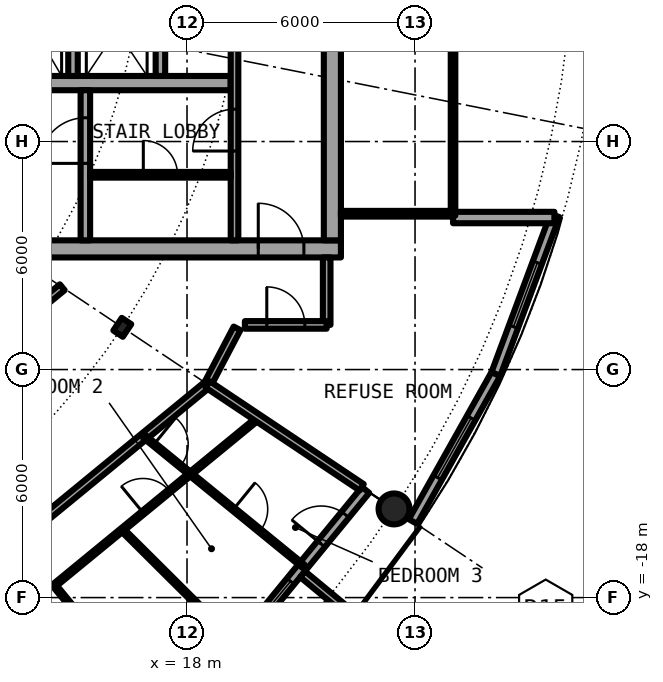
"""IFC4 building model, lengths in metres.
Left out: names, types, materials, properties, quantities, classifications, styles, units other than length and angle.
Written with IfcOpenShell. Run it as: python <this file> out.ifc"""

import sys

from ifc_helpers import new_model, si_unit, direction, frame, frame_2d, origin, origin_2d, place, context, subcontext, project, spatial, rectangle, hollow_circle, i_section, extrude, element, fill, save


model = new_model("IFC4")
c1 = context("Model", 3, precision=1e-05, world=origin(), true_north=direction((0.0, 1.0)))
c2 = subcontext(c1, "Body", "Model", "MODEL_VIEW")
j1 = project(units=[si_unit("LENGTHUNIT", "METRE"), si_unit("PLANEANGLEUNIT", "RADIAN")], contexts=[c1])
p1 = place(None, origin())
s1 = spatial("IfcSite", under=j1, at=p1, CompositionType="ELEMENT")
p2 = place(p1, origin())
s2 = spatial("IfcBuilding", under=s1, at=p2, CompositionType="ELEMENT")
p3 = place(p2, frame((0.0, 0.0, 202.4)))
s3 = spatial("IfcBuildingStorey", under=s2, at=p3, CompositionType="ELEMENT", Elevation=202.4)
p4 = place(p3, frame((23.448, -15.667, 0.0), z_axis=(0.0, 0.0, 1.0), x_axis=(1.0, 0.0, 0.0)))
e1 = element("IfcColumn", 1, at=p4, inside=s3, PredefinedType="COLUMN", context=c2, shape_type="SweptSolid", body=[
    extrude(hollow_circle(Radius=0.406, WallThickness=0.03, at=origin_2d()), origin(), (0.0, 0.0, 1.0), 3.05),
])
p5 = place(p3, frame((16.297, -10.889, 0.0), z_axis=(0.0, 0.0, 1.0), x_axis=(0.831469612303, -0.55557023302, 0.0)))
e2 = element("IfcColumn", 2, at=p5, inside=s3, PredefinedType="COLUMN", context=c2, shape_type="SweptSolid", body=[
    extrude(i_section(OverallWidth=0.3, OverallDepth=0.4, WebThickness=0.013, FlangeThickness=0.024, FilletRadius=0.027, at=origin_2d()), origin(), (0.0, 0.0, 1.0), 3.05),
])
p6 = place(p3, frame((19.304, -19.304, 0.0), z_axis=(0.0, 0.0, 1.0), x_axis=(0.634382322723, 0.773019449054, 0.0)))
e3 = element("IfcWall", 3, at=p6, inside=s3, PredefinedType="SOLIDWALL", context=c2, shape_type="SweptSolid", body=[
    extrude(rectangle(XDim=5.352, YDim=0.25, at=frame_2d((2.676, 0.0))), origin(), (0.0, 0.0, 1.0), 2.7),
])
p7 = place(p6, frame((0.441, 0.0, 0.3)))
e4 = element("IfcOpeningElement", 4, at=p7, cuts=e3, PredefinedType="OPENING", context=c2, shape_type="SweptSolid", body=[
    extrude(rectangle(XDim=1.8, YDim=2.1, at=frame_2d((0.9, 1.05))), frame((0.0, 0.135, 0.0), z_axis=(0.0, -1.0, 0.0), x_axis=(1.0, 0.0, 0.0)), (0.0, 0.0, 1.0), 0.27),
])
p8 = place(p6, frame((3.51, 0.0, 0.0)))
e5 = element("IfcOpeningElement", 5, at=p8, cuts=e3, PredefinedType="OPENING", context=c2, shape_type="SweptSolid", body=[
    extrude(rectangle(XDim=1.0, YDim=2.2, at=frame_2d((0.5, 1.1))), frame((0.0, 0.135, 0.0), z_axis=(0.0, -1.0, 0.0), x_axis=(1.0, 0.0, 0.0)), (0.0, 0.0, 1.0), 0.27),
])
p9 = place(p3, frame((21.041, -17.384, -0.03), z_axis=(0.0, 0.0, 1.0), x_axis=(0.770784861449, -0.63709551667, 0.0)))
e6 = element("IfcWall", 6, at=p9, inside=s3, PredefinedType="SOLIDWALL", context=c2, shape_type="SweptSolid", body=[
    extrude(rectangle(XDim=3.006, YDim=0.2, at=frame_2d((1.503, 0.0))), origin(), (0.0, 0.0, 1.0), 2.73),
])
p10 = place(p3, frame((23.946, -16.0, 0.0), z_axis=(0.0, 0.0, 1.0), x_axis=(0.489696356642, 0.871893042919, 0.0)))
e7 = element("IfcWall", 7, at=p10, inside=s3, PredefinedType="SOLIDWALL", context=c2, shape_type="SweptSolid", body=[
    extrude(rectangle(XDim=4.454, YDim=0.25, at=frame_2d((2.227, 0.0))), origin(), (0.0, 0.0, 1.0), 2.7),
])
p11 = place(p10, frame((1.327, 0.0, 0.3)))
e8 = element("IfcOpeningElement", 8, at=p11, cuts=e7, PredefinedType="OPENING", context=c2, shape_type="SweptSolid", body=[
    extrude(rectangle(XDim=1.8, YDim=2.1, at=frame_2d((0.9, 1.05))), frame((0.0, 0.135, 0.0), z_axis=(0.0, -1.0, 0.0), x_axis=(1.0, 0.0, 0.0)), (0.0, 0.0, 1.0), 0.27),
])
p12 = place(p3, frame((26.127, -12.117, 0.0), z_axis=(0.0, 0.0, 1.0), x_axis=(0.349247811493, 0.937030397675, 0.0)))
e9 = element("IfcWall", 9, at=p12, inside=s3, PredefinedType="SOLIDWALL", context=c2, shape_type="SweptSolid", body=[
    extrude(rectangle(XDim=4.452, YDim=0.25, at=frame_2d((2.226, 0.0))), origin(), (0.0, 0.0, 1.0), 2.7),
])
p13 = place(p12, frame((1.327, 0.0, 0.3)))
e10 = element("IfcOpeningElement", 10, at=p13, cuts=e9, PredefinedType="OPENING", context=c2, shape_type="SweptSolid", body=[
    extrude(rectangle(XDim=1.8, YDim=2.1, at=frame_2d((0.9, 1.05))), frame((0.0, 0.135, 0.0), z_axis=(0.0, -1.0, 0.0), x_axis=(1.0, 0.0, 0.0)), (0.0, 0.0, 1.0), 0.27),
])
p14 = place(p3, frame((25.0, -8.0, 0.0), z_axis=(0.0, 0.0, 1.0), x_axis=(1.0, 0.0, 0.0)))
e11 = element("IfcWall", 11, at=p14, inside=s3, PredefinedType="SOLIDWALL", context=c2, shape_type="SweptSolid", body=[
    extrude(rectangle(XDim=2.667, YDim=0.3, at=frame_2d((1.333, 0.0))), origin(), (0.0, 0.0, 1.0), 2.7),
])
p15 = place(p3, frame((8.55, -8.825, 0.0), z_axis=(0.0, 0.0, 1.0), x_axis=(1.0, 0.0, 0.0)))
e12 = element("IfcWall", 12, at=p15, inside=s3, PredefinedType="SHEAR", context=c2, shape_type="SweptSolid", body=[
    extrude(rectangle(XDim=13.5, YDim=0.45, at=frame_2d((6.75, 0.0))), origin(), (0.0, 0.0, 1.0), 3.05),
])
p16 = place(p15, frame((11.325, 0.0, 0.0)))
e13 = element("IfcOpeningElement", 13, at=p16, cuts=e12, PredefinedType="OPENING", context=c2, shape_type="SweptSolid", body=[
    extrude(rectangle(XDim=1.2, YDim=2.3, at=frame_2d((0.6, 1.15))), frame((0.0, 0.235, 0.0), z_axis=(0.0, -1.0, 0.0), x_axis=(1.0, 0.0, 0.0)), (0.0, 0.0, 1.0), 0.47),
])
p17 = place(p3, frame((21.825, 8.6, 0.0), z_axis=(0.0, 0.0, 1.0), x_axis=(0.0, -1.0, 0.0)))
e14 = element("IfcWall", 14, at=p17, inside=s3, PredefinedType="SHEAR", context=c2, shape_type="SweptSolid", body=[
    extrude(rectangle(XDim=17.2, YDim=0.45, at=frame_2d((8.6, 0.0))), origin(), (0.0, 0.0, 1.0), 3.05),
])
p18 = place(p17, frame((7.7, 0.0, 0.0)))
e15 = element("IfcOpeningElement", 15, at=p18, cuts=e14, PredefinedType="OPENING", context=c2, shape_type="SweptSolid", body=[
    extrude(rectangle(XDim=1.8, YDim=2.3, at=frame_2d((0.9, 1.15))), frame((0.0, 0.235, 0.0), z_axis=(0.0, -1.0, 0.0), x_axis=(1.0, 0.0, 0.0)), (0.0, 0.0, 1.0), 0.47),
])
p19 = place(p3, frame((9.0, -4.462, 0.0), z_axis=(0.0, 0.0, 1.0), x_axis=(1.0, 0.0, 0.0)))
e16 = element("IfcWall", 16, at=p19, inside=s3, PredefinedType="SHEAR", context=c2, shape_type="SweptSolid", body=[
    extrude(rectangle(XDim=10.15, YDim=0.375, at=frame_2d((5.075, 0.0))), origin(), (0.0, 0.0, 1.0), 3.05),
])
p20 = place(p3, frame((15.325, -8.6, 0.0), z_axis=(0.0, 0.0, 1.0), x_axis=(0.0, 1.0, 0.0)))
e17 = element("IfcWall", 17, at=p20, inside=s3, PredefinedType="SHEAR", context=c2, shape_type="SweptSolid", body=[
    extrude(rectangle(XDim=3.95, YDim=0.25, at=frame_2d((1.975, 0.0))), origin(), (0.0, 0.0, 1.0), 3.05),
])
p21 = place(p20, frame((2.025, 0.0, 0.0)))
e18 = element("IfcOpeningElement", 18, at=p21, cuts=e17, PredefinedType="OPENING", context=c2, shape_type="SweptSolid", body=[
    extrude(rectangle(XDim=1.2, YDim=2.3, at=frame_2d((0.6, 1.15))), frame((0.0, 0.135, 0.0), z_axis=(0.0, -1.0, 0.0), x_axis=(1.0, 0.0, 0.0)), (0.0, 0.0, 1.0), 0.27),
])
for number, where, z_axis, x_axis in (
    (19, (15.0, -1.825, 0.0), (0.0, 0.0, 1.0), (0.0, -1.0, 0.0)),
    (20, (17.3, -1.825, 0.0), (0.0, 0.0, 1.0), (0.0, -1.0, 0.0)),
):
    element("IfcWall", number, at=place(p3, frame(where, z_axis=z_axis, x_axis=x_axis)), inside=s3, PredefinedType="SOLIDWALL", context=c2, shape_type="SweptSolid", body=[
        extrude(rectangle(XDim=2.45, YDim=0.25, at=frame_2d((1.225, 0.0))), origin(), (0.0, 0.0, 1.0), 2.7),
    ])
p22 = place(p3, frame((19.25, -8.6, 0.0), z_axis=(0.0, 0.0, 1.0), x_axis=(0.0, 1.0, 0.0)))
e21 = element("IfcWall", 21, at=p22, inside=s3, PredefinedType="SOLIDWALL", context=c2, shape_type="SweptSolid", body=[
    extrude(rectangle(XDim=7.025, YDim=0.2, at=frame_2d((3.513, 0.0))), origin(), (0.0, 0.0, 1.0), 2.7),
])
p23 = place(p22, frame((2.35, 0.0, 0.0)))
e22 = element("IfcOpeningElement", 22, at=p23, cuts=e21, PredefinedType="OPENING", context=c2, shape_type="SweptSolid", body=[
    extrude(rectangle(XDim=1.1, YDim=2.3, at=frame_2d((0.55, 1.15))), frame((0.0, 0.11, 0.0), z_axis=(0.0, -1.0, 0.0), x_axis=(1.0, 0.0, 0.0)), (0.0, 0.0, 1.0), 0.22),
])
p24 = place(p3, frame((15.45, -6.875, 0.0), z_axis=(0.0, 0.0, 1.0), x_axis=(1.0, 0.0, 0.0)))
e23 = element("IfcWall", 23, at=p24, inside=s3, PredefinedType="PARTITIONING", context=c2, shape_type="SweptSolid", body=[
    extrude(rectangle(XDim=3.7, YDim=0.15, at=frame_2d((1.85, 0.0))), origin(), (0.0, 0.0, 1.0), 2.7),
])
p25 = place(p24, frame((1.4, 0.0, 0.0)))
e24 = element("IfcOpeningElement", 24, at=p25, cuts=e23, PredefinedType="OPENING", context=c2, shape_type="SweptSolid", body=[
    extrude(rectangle(XDim=0.9, YDim=2.3, at=frame_2d((0.45, 1.15))), frame((0.0, 0.085, 0.0), z_axis=(0.0, -1.0, 0.0), x_axis=(1.0, 0.0, 0.0)), (0.0, 0.0, 1.0), 0.17),
])
p26 = place(p3, frame((22.05, -7.9, 0.0), z_axis=(0.0, 0.0, 1.0), x_axis=(1.0, 0.0, 0.0)))
e25 = element("IfcWall", 25, at=p26, inside=s3, PredefinedType="PARTITIONING", context=c2, shape_type="SweptSolid", body=[
    extrude(rectangle(XDim=2.89, YDim=0.15, at=frame_2d((1.445, 0.0))), origin(), (0.0, 0.0, 1.0), 2.7),
])
p27 = place(p3, frame((25.0, -7.95, 0.0), z_axis=(0.0, 0.0, 1.0), x_axis=(0.0, 1.0, 0.0)))
e26 = element("IfcWall", 26, at=p27, inside=s3, PredefinedType="PARTITIONING", context=c2, shape_type="SweptSolid", body=[
    extrude(rectangle(XDim=15.9, YDim=0.12, at=frame_2d((7.95, 0.0))), origin(), (0.0, 0.0, 1.0), 2.7),
])
p28 = place(p27, frame((0.95, 0.0, 0.1)))
e27 = element("IfcOpeningElement", 27, at=p28, cuts=e26, PredefinedType="OPENING", context=c2, shape_type="SweptSolid", body=[
    extrude(rectangle(XDim=14.0, YDim=2.35, at=frame_2d((7.0, 1.175))), frame((0.0, 0.07, 0.0), z_axis=(0.0, -1.0, 0.0), x_axis=(1.0, 0.0, 0.0)), (0.0, 0.0, 1.0), 0.14),
])
p29 = place(p3, frame((14.507, -17.682, 0.0), z_axis=(0.0, 0.0, 1.0), x_axis=(0.773143248755, 0.634231437966, 0.0)))
e28 = element("IfcWall", 28, at=p29, inside=s3, PredefinedType="PARTITIONING", context=c2, shape_type="SweptSolid", body=[
    extrude(rectangle(XDim=6.94, YDim=0.1, at=frame_2d((3.47, 0.0))), origin(), (0.0, 0.0, 1.0), 2.7),
])
p30 = place(p29, frame((3.021, 0.0, 0.0)))
e29 = element("IfcOpeningElement", 29, at=p30, cuts=e28, PredefinedType="OPENING", context=c2, shape_type="SweptSolid", body=[
    extrude(rectangle(XDim=0.9, YDim=2.3, at=frame_2d((0.45, 1.15))), frame((0.0, 0.06, 0.0), z_axis=(0.0, -1.0, 0.0), x_axis=(1.0, 0.0, 0.0)), (0.0, 0.0, 1.0), 0.12),
])
p31 = place(p3, frame((18.542, -12.389, 0.0), z_axis=(0.0, 0.0, 1.0), x_axis=(0.465359652486, 0.885121683068, 0.0)))
e30 = element("IfcWall", 30, at=p31, inside=s3, PredefinedType="PARTITIONING", context=c2, shape_type="SweptSolid", body=[
    extrude(rectangle(XDim=1.665, YDim=0.2, at=frame_2d((0.833, 0.0))), origin(), (0.0, 0.0, 1.0), 2.7),
])
p32 = place(p3, frame((21.675, -10.825, 0.0), z_axis=(0.0, 0.0, 1.0), x_axis=(0.0, 1.0, 0.0)))
e31 = element("IfcWall", 31, at=p32, inside=s3, PredefinedType="PARTITIONING", context=c2, shape_type="SweptSolid", body=[
    extrude(rectangle(XDim=1.775, YDim=0.2, at=frame_2d((0.887, 0.0))), origin(), (0.0, 0.0, 1.0), 2.7),
])
p33 = place(p3, frame((8.534, -20.603, 0.0), z_axis=(0.0, 0.0, 1.0), x_axis=(0.772983503654, 0.634426121056, 0.0)))
e32 = element("IfcWall", 32, at=p33, inside=s3, PredefinedType="PARTITIONING", context=c2, shape_type="SweptSolid", body=[
    extrude(rectangle(XDim=12.947, YDim=0.2, at=frame_2d((6.474, 0.0))), origin(), (0.0, 0.0, 1.0), 2.7),
])
p34 = place(p33, frame((5.974, 0.0, 0.0)))
e33 = element("IfcOpeningElement", 33, at=p34, cuts=e32, PredefinedType="OPENING", context=c2, shape_type="SweptSolid", body=[
    extrude(rectangle(XDim=1.0, YDim=2.3, at=frame_2d((0.5, 1.15))), frame((0.0, 0.11, 0.0), z_axis=(0.0, -1.0, 0.0), x_axis=(1.0, 0.0, 0.0)), (0.0, 0.0, 1.0), 0.22),
])
p35 = place(p3, frame((6.773, -16.353, 0.0), z_axis=(0.0, 0.0, 1.0), x_axis=(0.773034536097, 0.634363938131, 0.0)))
e34 = element("IfcWall", 34, at=p35, inside=s3, PredefinedType="PARTITIONING", context=c2, shape_type="SweptSolid", body=[
    extrude(rectangle(XDim=10.277, YDim=0.2, at=frame_2d((5.138, 0.0))), origin(), (0.0, 0.0, 1.0), 2.7),
])
p36 = place(p35, frame((4.638, 0.0, 0.0)))
e35 = element("IfcOpeningElement", 35, at=p36, cuts=e34, PredefinedType="OPENING", context=c2, shape_type="SweptSolid", body=[
    extrude(rectangle(XDim=1.0, YDim=2.3, at=frame_2d((0.5, 1.15))), frame((0.0, 0.11, 0.0), z_axis=(0.0, -1.0, 0.0), x_axis=(1.0, 0.0, 0.0)), (0.0, 0.0, 1.0), 0.22),
])
p37 = place(p3, frame((19.523, -10.825, 0.0), z_axis=(0.0, 0.0, 1.0), x_axis=(1.0, 0.0, 0.0)))
e36 = element("IfcWall", 36, at=p37, inside=s3, PredefinedType="PARTITIONING", context=c2, shape_type="SweptSolid", body=[
    extrude(rectangle(XDim=2.152, YDim=0.2, at=frame_2d((1.076, 0.0))), origin(), (0.0, 0.0, 1.0), 2.7),
])
p38 = place(p37, frame((0.576, 0.0, 0.0)))
e37 = element("IfcOpeningElement", 37, at=p38, cuts=e36, PredefinedType="OPENING", context=c2, shape_type="SweptSolid", body=[
    extrude(rectangle(XDim=1.0, YDim=2.3, at=frame_2d((0.5, 1.15))), frame((0.0, 0.11, 0.0), z_axis=(0.0, -1.0, 0.0), x_axis=(1.0, 0.0, 0.0)), (0.0, 0.0, 1.0), 0.22),
])
p39 = place(p3, frame((14.509, -17.679, 0.0), z_axis=(0.0, 0.0, 1.0), x_axis=(0.634342681687, -0.77305197897, 0.0)))
e38 = element("IfcWall", 38, at=p39, inside=s3, PredefinedType="PARTITIONING", context=c2, shape_type="SweptSolid", body=[
    extrude(rectangle(XDim=4.305, YDim=0.1, at=frame_2d((2.153, 0.0))), origin(), (0.0, 0.0, 1.0), 2.7),
])
p40 = place(p39, frame((1.703, 0.0, 0.0)))
e39 = element("IfcOpeningElement", 39, at=p40, cuts=e38, PredefinedType="OPENING", context=c2, shape_type="SweptSolid", body=[
    extrude(rectangle(XDim=0.9, YDim=2.3, at=frame_2d((0.45, 1.15))), frame((0.0, 0.06, 0.0), z_axis=(0.0, -1.0, 0.0), x_axis=(1.0, 0.0, 0.0)), (0.0, 0.0, 1.0), 0.12),
])
p41 = place(p3, frame((16.295, -16.214, 0.0), z_axis=(0.0, 0.0, 1.0), x_axis=(0.709028177231, -0.705180149956, 0.0)))
e40 = element("IfcWall", 40, at=p41, inside=s3, PredefinedType="PARTITIONING", context=c2, shape_type="SweptSolid", body=[
    extrude(rectangle(XDim=4.188, YDim=0.1, at=frame_2d((2.094, 0.0))), origin(), (0.0, 0.0, 1.0), 2.7),
])
p42 = place(p3, frame((16.874, -13.758, 0.0), z_axis=(0.0, 0.0, 1.0), x_axis=(0.774926754572, -0.632051046236, 0.0)))
e41 = element("IfcWall", 41, at=p42, inside=s3, PredefinedType="PARTITIONING", context=c2, shape_type="SweptSolid", body=[
    extrude(rectangle(XDim=5.403, YDim=0.1, at=frame_2d((2.702, 0.0))), origin(), (0.0, 0.0, 1.0), 2.7),
])
p43 = place(p42, frame((0.331, 0.0, 0.0)))
e42 = element("IfcOpeningElement", 42, at=p43, cuts=e41, PredefinedType="OPENING", context=c2, shape_type="SweptSolid", body=[
    extrude(rectangle(XDim=0.9, YDim=2.3, at=frame_2d((0.45, 1.15))), frame((0.0, 0.06, 0.0), z_axis=(0.0, -1.0, 0.0), x_axis=(1.0, 0.0, 0.0)), (0.0, 0.0, 1.0), 0.12),
])
p44 = place(p42, frame((3.032, 0.0, 0.0)))
e43 = element("IfcOpeningElement", 43, at=p44, cuts=e41, PredefinedType="OPENING", context=c2, shape_type="SweptSolid", body=[
    extrude(rectangle(XDim=0.9, YDim=2.3, at=frame_2d((0.45, 1.15))), frame((0.0, 0.06, 0.0), z_axis=(0.0, -1.0, 0.0), x_axis=(1.0, 0.0, 0.0)), (0.0, 0.0, 1.0), 0.12),
])
p45 = place(p3, frame((18.542, -12.389, 0.0), z_axis=(0.0, 0.0, 1.0), x_axis=(0.831387096605, -0.55569370664, 0.0)))
e44 = element("IfcWall", 44, at=p45, inside=s3, PredefinedType="PARTITIONING", context=c2, shape_type="SweptSolid", body=[
    extrude(rectangle(XDim=4.875, YDim=0.2, at=frame_2d((2.438, 0.0))), origin(), (0.0, 0.0, 1.0), 2.7),
])
p46 = place(p7, origin())
e45 = element("IfcWindow", 45, at=p46, inside=s3, PartitioningType="SINGLE_PANEL", PredefinedType="WINDOW", context=c2, shape_type="SweptSolid", body=[
    extrude(rectangle(XDim=1.8, YDim=2.1, at=frame_2d((0.9, 1.05))), frame((0.0, 0.03, 0.0), z_axis=(0.0, -1.0, 0.0), x_axis=(1.0, 0.0, 0.0)), (0.0, 0.0, 1.0), 0.06),
])
fill(e4, e45)
p47 = place(p8, origin())
e46 = element("IfcDoor", 46, at=p47, inside=s3, OperationType="SINGLE_SWING_LEFT", PredefinedType="DOOR", context=c2, shape_type="SweptSolid", body=[
    extrude(rectangle(XDim=1.0, YDim=2.2, at=frame_2d((0.5, 1.1))), frame((0.0, 0.025, 0.0), z_axis=(0.0, -1.0, 0.0), x_axis=(1.0, 0.0, 0.0)), (0.0, 0.0, 1.0), 0.05),
])
fill(e5, e46)
p48 = place(p11, origin())
e47 = element("IfcWindow", 47, at=p48, inside=s3, PartitioningType="SINGLE_PANEL", PredefinedType="WINDOW", context=c2, shape_type="SweptSolid", body=[
    extrude(rectangle(XDim=1.8, YDim=2.1, at=frame_2d((0.9, 1.05))), frame((0.0, 0.03, 0.0), z_axis=(0.0, -1.0, 0.0), x_axis=(1.0, 0.0, 0.0)), (0.0, 0.0, 1.0), 0.06),
])
fill(e8, e47)
p49 = place(p13, origin())
e48 = element("IfcWindow", 48, at=p49, inside=s3, PartitioningType="SINGLE_PANEL", PredefinedType="WINDOW", context=c2, shape_type="SweptSolid", body=[
    extrude(rectangle(XDim=1.8, YDim=2.1, at=frame_2d((0.9, 1.05))), frame((0.0, 0.03, 0.0), z_axis=(0.0, -1.0, 0.0), x_axis=(1.0, 0.0, 0.0)), (0.0, 0.0, 1.0), 0.06),
])
fill(e10, e48)
p50 = place(p25, origin())
e49 = element("IfcDoor", 49, at=p50, inside=s3, OperationType="SINGLE_SWING_LEFT", PredefinedType="DOOR", context=c2, shape_type="SweptSolid", body=[
    extrude(rectangle(XDim=0.9, YDim=2.3, at=frame_2d((0.45, 1.15))), frame((0.0, 0.025, 0.0), z_axis=(0.0, -1.0, 0.0), x_axis=(1.0, 0.0, 0.0)), (0.0, 0.0, 1.0), 0.05),
])
fill(e24, e49)
p51 = place(p21, origin())
e50 = element("IfcDoor", 50, at=p51, inside=s3, OperationType="SINGLE_SWING_LEFT", PredefinedType="DOOR", context=c2, shape_type="SweptSolid", body=[
    extrude(rectangle(XDim=1.2, YDim=2.3, at=frame_2d((0.6, 1.15))), frame((0.0, 0.025, 0.0), z_axis=(0.0, -1.0, 0.0), x_axis=(1.0, 0.0, 0.0)), (0.0, 0.0, 1.0), 0.05),
])
fill(e18, e50)
p52 = place(p23, origin())
e51 = element("IfcDoor", 51, at=p52, inside=s3, OperationType="SINGLE_SWING_RIGHT", PredefinedType="DOOR", context=c2, shape_type="SweptSolid", body=[
    extrude(rectangle(XDim=1.1, YDim=2.3, at=frame_2d((0.55, 1.15))), frame((0.0, 0.025, 0.0), z_axis=(0.0, -1.0, 0.0), x_axis=(1.0, 0.0, 0.0)), (0.0, 0.0, 1.0), 0.05),
])
fill(e22, e51)
p53 = place(p16, origin())
e52 = element("IfcDoor", 52, at=p53, inside=s3, OperationType="SINGLE_SWING_LEFT", PredefinedType="DOOR", context=c2, shape_type="SweptSolid", body=[
    extrude(rectangle(XDim=1.2, YDim=2.3, at=frame_2d((0.6, 1.15))), frame((0.0, 0.025, 0.0), z_axis=(0.0, -1.0, 0.0), x_axis=(1.0, 0.0, 0.0)), (0.0, 0.0, 1.0), 0.05),
])
fill(e13, e52)
p54 = place(p28, origin())
e53 = element("IfcWindow", 53, at=p54, inside=s3, PartitioningType="SINGLE_PANEL", PredefinedType="WINDOW", context=c2, shape_type="SweptSolid", body=[
    extrude(rectangle(XDim=14.0, YDim=2.35, at=frame_2d((7.0, 1.175))), frame((0.0, 0.03, 0.0), z_axis=(0.0, -1.0, 0.0), x_axis=(1.0, 0.0, 0.0)), (0.0, 0.0, 1.0), 0.06),
])
fill(e27, e53)
p55 = place(p43, origin())
e54 = element("IfcDoor", 54, at=p55, inside=s3, OperationType="SINGLE_SWING_LEFT", PredefinedType="DOOR", context=c2, shape_type="SweptSolid", body=[
    extrude(rectangle(XDim=0.9, YDim=2.3, at=frame_2d((0.45, 1.15))), frame((0.0, 0.025, 0.0), z_axis=(0.0, -1.0, 0.0), x_axis=(1.0, 0.0, 0.0)), (0.0, 0.0, 1.0), 0.05),
])
fill(e42, e54)
p56 = place(p30, origin())
e55 = element("IfcDoor", 55, at=p56, inside=s3, OperationType="SINGLE_SWING_RIGHT", PredefinedType="DOOR", context=c2, shape_type="SweptSolid", body=[
    extrude(rectangle(XDim=0.9, YDim=2.3, at=frame_2d((0.45, 1.15))), frame((0.0, 0.025, 0.0), z_axis=(0.0, -1.0, 0.0), x_axis=(1.0, 0.0, 0.0)), (0.0, 0.0, 1.0), 0.05),
])
fill(e29, e55)
p57 = place(p44, origin())
e56 = element("IfcDoor", 56, at=p57, inside=s3, OperationType="SINGLE_SWING_RIGHT", PredefinedType="DOOR", context=c2, shape_type="SweptSolid", body=[
    extrude(rectangle(XDim=0.9, YDim=2.3, at=frame_2d((0.45, 1.15))), frame((0.0, 0.025, 0.0), z_axis=(0.0, -1.0, 0.0), x_axis=(1.0, 0.0, 0.0)), (0.0, 0.0, 1.0), 0.05),
])
fill(e43, e56)
p58 = place(p38, origin())
e57 = element("IfcDoor", 57, at=p58, inside=s3, OperationType="SINGLE_SWING_LEFT", PredefinedType="DOOR", context=c2, shape_type="SweptSolid", body=[
    extrude(rectangle(XDim=1.0, YDim=2.3, at=frame_2d((0.5, 1.15))), frame((0.0, 0.025, 0.0), z_axis=(0.0, -1.0, 0.0), x_axis=(1.0, 0.0, 0.0)), (0.0, 0.0, 1.0), 0.05),
])
fill(e37, e57)
save(model, sys.argv[1])
